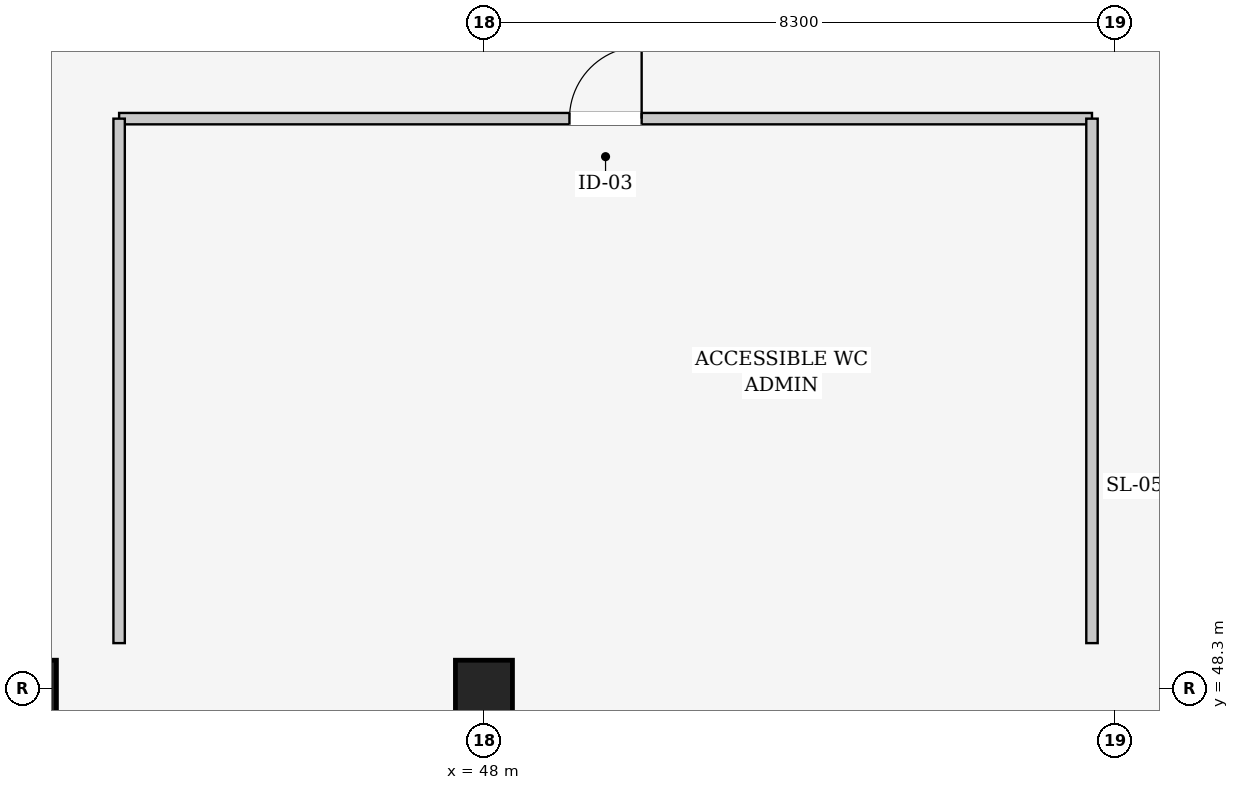
"""IFC4 building model, lengths in metres.
Left out: names, types, materials, properties, quantities, classifications, styles, units other than length and angle.
Written with IfcOpenShell. Run it as: python <this file> out.ifc"""

import sys

from ifc_helpers import new_model, si_unit, direction, frame, frame_2d, origin, origin_2d, place, context, subcontext, project, spatial, rectangle, extrude, element, fill, save


model = new_model("IFC4")
c1 = context("Model", 3, precision=1e-05, world=origin(), true_north=direction((0.0, 1.0)))
c2 = subcontext(c1, "Body", "Model", "MODEL_VIEW")
j1 = project(units=[si_unit("LENGTHUNIT", "METRE"), si_unit("PLANEANGLEUNIT", "RADIAN")], contexts=[c1])
p1 = place(None, origin())
s1 = spatial("IfcSite", under=j1, at=p1, CompositionType="ELEMENT")
p2 = place(p1, origin())
s2 = spatial("IfcBuilding", under=s1, at=p2, CompositionType="ELEMENT")
p3 = place(p2, frame((0.0, 0.0, 11.4)))
s3 = spatial("IfcBuildingStorey", under=s2, at=p3, CompositionType="ELEMENT", Elevation=11.4)
for number, where, z_axis, x_axis in (
    (1, (42.0, 48.3, 0.0), (0.0, 0.0, 1.0), (1.0, 0.0, 0.0)),
    (2, (48.0, 48.3, 0.0), (0.0, 0.0, 1.0), (1.0, 0.0, 0.0)),
):
    element("IfcColumn", number, at=place(p3, frame(where, z_axis=z_axis, x_axis=x_axis)), inside=s3, PredefinedType="COLUMN", context=c2, shape_type="SweptSolid", body=[
        extrude(rectangle(XDim=0.75, YDim=0.75, at=origin_2d()), origin(), (0.0, 0.0, 1.0), 4.8),
    ])
p4 = place(p3, frame((43.2, 55.8, 0.0), z_axis=(0.0, 0.0, 1.0), x_axis=(1.0, 0.0, 0.0)))
e3 = element("IfcWall", 3, at=p4, inside=s3, PredefinedType="PARTITIONING", context=c2, shape_type="SweptSolid", body=[
    extrude(rectangle(XDim=12.8, YDim=0.15, at=frame_2d((6.4, 0.0))), origin(), (0.0, 0.0, 1.0), 3.922),
])
p5 = place(p4, frame((5.925, 0.0, 0.0)))
e4 = element("IfcOpeningElement", 4, at=p5, cuts=e3, PredefinedType="OPENING", context=c2, shape_type="SweptSolid", body=[
    extrude(rectangle(XDim=0.95, YDim=2.15, at=frame_2d((0.475, 1.075))), frame((0.0, 0.085, 0.0), z_axis=(0.0, -1.0, 0.0), x_axis=(1.0, 0.0, 0.0)), (0.0, 0.0, 1.0), 0.17),
])
for number, where, z_axis, x_axis in (
    (5, (43.2, 48.9, 0.0), (0.0, 0.0, 1.0), (0.0, 1.0, 0.0)),
    (6, (56.0, 55.8, 0.0), (0.0, 0.0, 1.0), (0.0, -1.0, 0.0)),
):
    element("IfcWall", number, at=place(p3, frame(where, z_axis=z_axis, x_axis=x_axis)), inside=s3, PredefinedType="PARTITIONING", context=c2, shape_type="SweptSolid", body=[
        extrude(rectangle(XDim=6.9, YDim=0.15, at=frame_2d((3.45, 0.0))), origin(), (0.0, 0.0, 1.0), 4.1),
    ])
p6 = place(p5, origin())
e7 = element("IfcDoor", 7, at=p6, inside=s3, OperationType="SINGLE_SWING_RIGHT", PredefinedType="DOOR", context=c2, shape_type="SweptSolid", body=[
    extrude(rectangle(XDim=0.95, YDim=2.15, at=frame_2d((0.475, 1.075))), frame((0.0, 0.025, 0.0), z_axis=(0.0, -1.0, 0.0), x_axis=(1.0, 0.0, 0.0)), (0.0, 0.0, 1.0), 0.05),
])
fill(e4, e7)
save(model, sys.argv[1])
